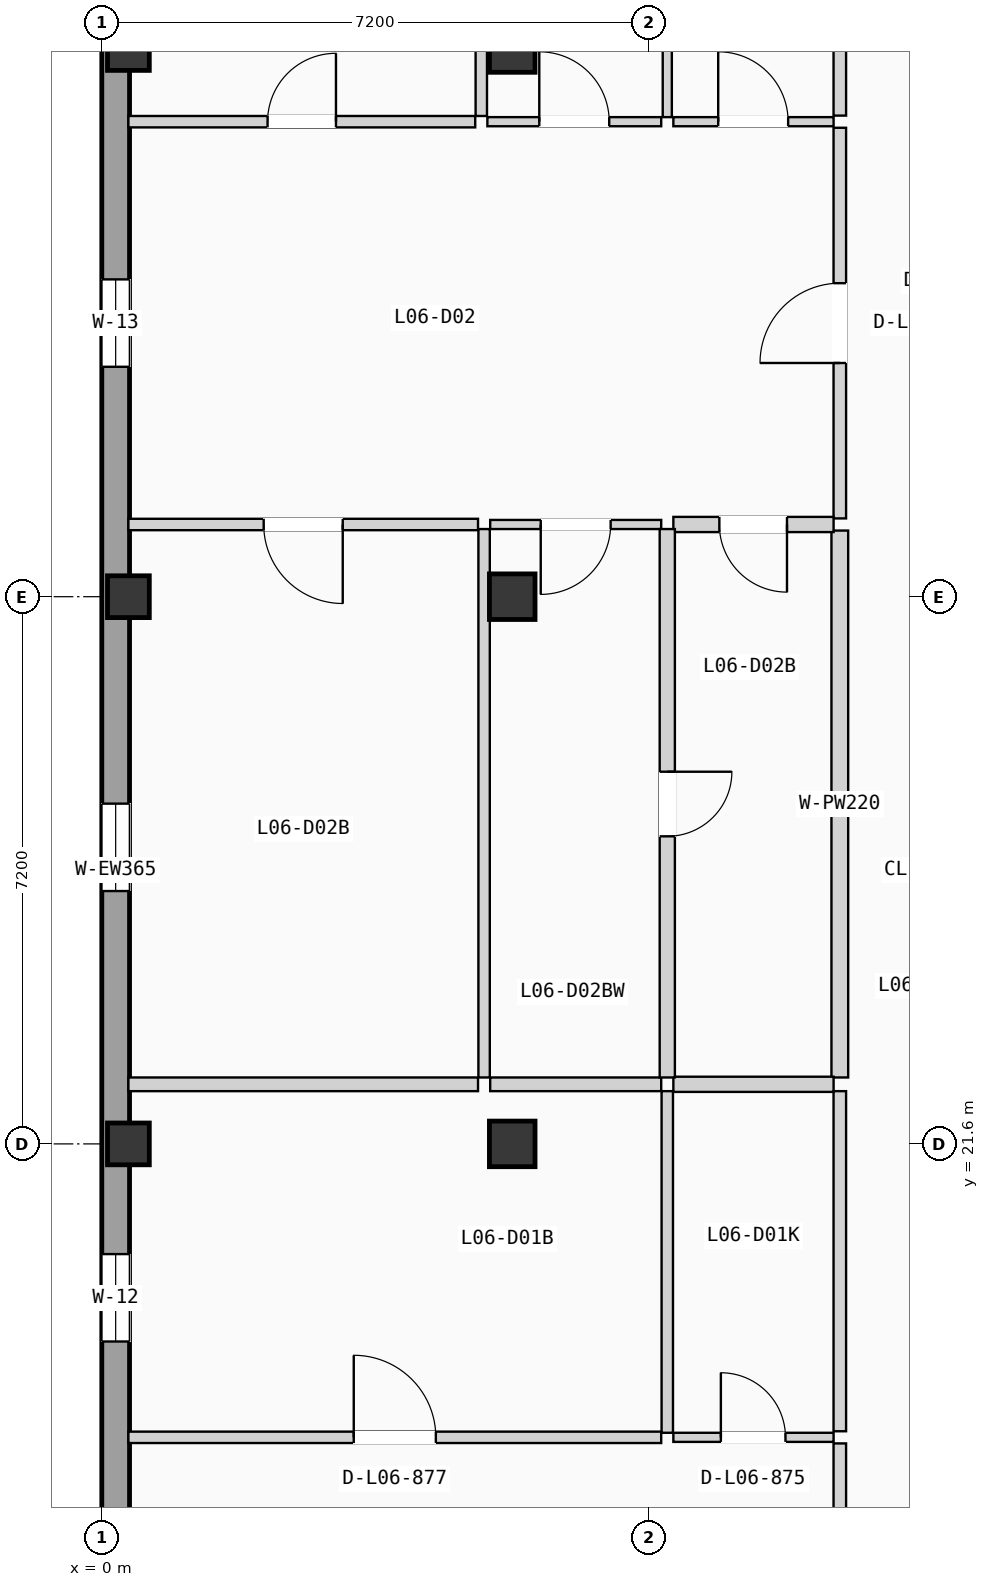
"""IFC4 building model, lengths in metres.
Left out: names, types, materials, properties, quantities, classifications, styles, units other than length and angle.
Written with IfcOpenShell. Run it as: python <this file> out.ifc"""

import sys

from ifc_helpers import new_model, si_unit, direction, frame, frame_2d, origin, origin_2d, place, context, subcontext, project, spatial, rectangle, extrude, element, fill, save


model = new_model("IFC4")
c1 = context("Model", 3, precision=1e-05, world=origin(), true_north=direction((0.0, 1.0)))
c2 = subcontext(c1, "Body", "Model", "MODEL_VIEW")
j1 = project(units=[si_unit("LENGTHUNIT", "METRE"), si_unit("PLANEANGLEUNIT", "RADIAN")], contexts=[c1])
p1 = place(None, origin())
s1 = spatial("IfcSite", under=j1, at=p1, CompositionType="ELEMENT")
p2 = place(p1, origin())
s2 = spatial("IfcBuilding", under=s1, at=p2, CompositionType="ELEMENT")
p3 = place(p2, frame((0.0, 0.0, 21.525)))
s3 = spatial("IfcBuildingStorey", under=s2, at=p3, CompositionType="ELEMENT", Elevation=21.525)
for number, where, z_axis, x_axis in (
    (1, (0.35, 21.6, 0.0), (0.0, 0.0, 1.0), (1.0, 0.0, 0.0)),
    (2, (0.35, 28.8, 0.0), (0.0, 0.0, 1.0), (1.0, 0.0, 0.0)),
    (3, (0.35, 36.0, 0.0), (0.0, 0.0, 1.0), (1.0, 0.0, 0.0)),
):
    element("IfcColumn", number, at=place(p3, frame(where, z_axis=z_axis, x_axis=x_axis)), inside=s3, PredefinedType="COLUMN", context=c2, shape_type="SweptSolid", body=[
        extrude(rectangle(XDim=0.55, YDim=0.55, at=origin_2d()), origin(), (0.0, 0.0, 1.0), 3.15),
    ])
for number, where, z_axis, x_axis in (
    (4, (5.4, 21.6, 0.0), (0.0, 0.0, 1.0), (1.0, 0.0, 0.0)),
    (5, (5.4, 28.8, 0.0), (0.0, 0.0, 1.0), (1.0, 0.0, 0.0)),
    (6, (5.4, 36.0, 0.0), (0.0, 0.0, 1.0), (1.0, 0.0, 0.0)),
):
    element("IfcColumn", number, at=place(p3, frame(where, z_axis=z_axis, x_axis=x_axis)), inside=s3, PredefinedType="COLUMN", context=c2, shape_type="SweptSolid", body=[
        extrude(rectangle(XDim=0.6, YDim=0.6, at=origin_2d()), origin(), (0.0, 0.0, 1.0), 3.15),
    ])
p4 = place(p3, frame((0.183, 0.365, 0.0), z_axis=(0.0, 0.0, 1.0), x_axis=(0.0, 1.0, 0.0)))
e7 = element("IfcWall", 7, at=p4, inside=s3, PredefinedType="SOLIDWALL", context=c2, shape_type="SweptSolid", body=[
    extrude(rectangle(XDim=49.67, YDim=0.365, at=frame_2d((24.835, 0.0))), origin(), (0.0, 0.0, 1.0), 2.89),
])
p5 = place(p4, frame((15.325, 0.0, 0.85)))
e8 = element("IfcOpeningElement", 8, at=p5, cuts=e7, PredefinedType="OPENING", context=c2, shape_type="SweptSolid", body=[
    extrude(rectangle(XDim=0.95, YDim=1.2, at=frame_2d((0.475, 0.6))), frame((0.0, 0.192, 0.0), z_axis=(0.0, -1.0, 0.0), x_axis=(1.0, 0.0, 0.0)), (0.0, 0.0, 1.0), 0.385),
])
p6 = place(p4, frame((8.897, 0.0, 0.9)))
e9 = element("IfcOpeningElement", 9, at=p6, cuts=e7, PredefinedType="OPENING", context=c2, shape_type="SweptSolid", body=[
    extrude(rectangle(XDim=1.15, YDim=1.2, at=frame_2d((0.575, 0.6))), frame((0.0, 0.192, 0.0), z_axis=(0.0, -1.0, 0.0), x_axis=(1.0, 0.0, 0.0)), (0.0, 0.0, 1.0), 0.385),
])
p7 = place(p4, frame((18.635, 0.0, 0.855)))
e10 = element("IfcOpeningElement", 10, at=p7, cuts=e7, PredefinedType="OPENING", context=c2, shape_type="SweptSolid", body=[
    extrude(rectangle(XDim=1.15, YDim=1.35, at=frame_2d((0.575, 0.675))), frame((0.0, 0.192, 0.0), z_axis=(0.0, -1.0, 0.0), x_axis=(1.0, 0.0, 0.0)), (0.0, 0.0, 1.0), 0.385),
])
p8 = place(p4, frame((31.46, 0.0, 0.705)))
e11 = element("IfcOpeningElement", 11, at=p8, cuts=e7, PredefinedType="OPENING", context=c2, shape_type="SweptSolid", body=[
    extrude(rectangle(XDim=1.15, YDim=1.5, at=frame_2d((0.575, 0.75))), frame((0.0, 0.192, 0.0), z_axis=(0.0, -1.0, 0.0), x_axis=(1.0, 0.0, 0.0)), (0.0, 0.0, 1.0), 0.385),
])
p9 = place(p4, frame((24.562, 0.0, 0.555)))
e12 = element("IfcOpeningElement", 12, at=p9, cuts=e7, PredefinedType="OPENING", context=c2, shape_type="SweptSolid", body=[
    extrude(rectangle(XDim=1.15, YDim=1.65, at=frame_2d((0.575, 0.825))), frame((0.0, 0.192, 0.0), z_axis=(0.0, -1.0, 0.0), x_axis=(1.0, 0.0, 0.0)), (0.0, 0.0, 1.0), 0.385),
])
p10 = place(p4, frame((38.695, 0.0, 0.85)))
e13 = element("IfcOpeningElement", 13, at=p10, cuts=e7, PredefinedType="OPENING", context=c2, shape_type="SweptSolid", body=[
    extrude(rectangle(XDim=0.95, YDim=1.2, at=frame_2d((0.475, 0.6))), frame((0.0, 0.192, 0.0), z_axis=(0.0, -1.0, 0.0), x_axis=(1.0, 0.0, 0.0)), (0.0, 0.0, 1.0), 0.385),
])
p11 = place(p3, frame((9.71, 12.235, 0.0), z_axis=(0.0, 0.0, 1.0), x_axis=(0.0, 1.0, 0.0)))
e14 = element("IfcWall", 14, at=p11, inside=s3, PredefinedType="PARTITIONING", context=c2, shape_type="SweptSolid", body=[
    extrude(rectangle(XDim=5.424, YDim=0.165, at=frame_2d((2.712, 0.0))), origin(), (0.0, 0.0, 1.0), 2.87),
])
p12 = place(p11, frame((2.187, 0.0, 0.0)))
e15 = element("IfcOpeningElement", 15, at=p12, cuts=e14, PredefinedType="OPENING", context=c2, shape_type="SweptSolid", body=[
    extrude(rectangle(XDim=1.05, YDim=2.13, at=frame_2d((0.525, 1.065))), frame((0.0, 0.093, 0.0), z_axis=(0.0, -1.0, 0.0), x_axis=(1.0, 0.0, 0.0)), (0.0, 0.0, 1.0), 0.185),
])
p13 = place(p3, frame((9.71, 17.819, 0.0), z_axis=(0.0, 0.0, 1.0), x_axis=(0.0, 1.0, 0.0)))
e16 = element("IfcWall", 16, at=p13, inside=s3, PredefinedType="PARTITIONING", context=c2, shape_type="SweptSolid", body=[
    extrude(rectangle(XDim=4.475, YDim=0.165, at=frame_2d((2.237, 0.0))), origin(), (0.0, 0.0, 1.0), 2.87),
])
p14 = place(p3, frame((9.71, 29.83, 0.0), z_axis=(0.0, 0.0, 1.0), x_axis=(0.0, 1.0, 0.0)))
e17 = element("IfcWall", 17, at=p14, inside=s3, PredefinedType="PARTITIONING", context=c2, shape_type="SweptSolid", body=[
    extrude(rectangle(XDim=5.14, YDim=0.165, at=frame_2d((2.57, 0.0))), origin(), (0.0, 0.0, 1.0), 2.87),
])
p15 = place(p14, frame((2.045, 0.0, 0.0)))
e18 = element("IfcOpeningElement", 18, at=p15, cuts=e17, PredefinedType="OPENING", context=c2, shape_type="SweptSolid", body=[
    extrude(rectangle(XDim=1.05, YDim=2.13, at=frame_2d((0.525, 1.065))), frame((0.0, 0.093, 0.0), z_axis=(0.0, -1.0, 0.0), x_axis=(1.0, 0.0, 0.0)), (0.0, 0.0, 1.0), 0.185),
])
p16 = place(p3, frame((9.71, 22.474, 0.0), z_axis=(0.0, 0.0, 1.0), x_axis=(0.0, 1.0, 0.0)))
e19 = element("IfcWall", 19, at=p16, inside=s3, PredefinedType="PLUMBINGWALL", context=c2, shape_type="SweptSolid", body=[
    extrude(rectangle(XDim=7.196, YDim=0.22, at=frame_2d((3.598, 0.0))), origin(), (0.0, 0.0, 1.0), 2.87),
])
p17 = place(p3, frame((9.71, 35.13, 0.0), z_axis=(0.0, 0.0, 1.0), x_axis=(0.0, 1.0, 0.0)))
e20 = element("IfcWall", 20, at=p17, inside=s3, PredefinedType="PARTITIONING", context=c2, shape_type="SweptSolid", body=[
    extrude(rectangle(XDim=7.67, YDim=0.165, at=frame_2d((3.835, 0.0))), origin(), (0.0, 0.0, 1.0), 2.87),
])
p18 = place(p3, frame((7.52, 17.739, 0.0), z_axis=(0.0, 0.0, 1.0), x_axis=(1.0, 0.0, 0.0)))
e21 = element("IfcWall", 21, at=p18, inside=s3, PredefinedType="PARTITIONING", context=c2, shape_type="SweptSolid", body=[
    extrude(rectangle(XDim=2.108, YDim=0.12, at=frame_2d((1.054, 0.0))), origin(), (0.0, 0.0, 1.0), 2.87),
])
p19 = place(p18, frame((0.625, 0.0, 0.0)))
e22 = element("IfcOpeningElement", 22, at=p19, cuts=e21, PredefinedType="OPENING", context=c2, shape_type="SweptSolid", body=[
    extrude(rectangle(XDim=0.85, YDim=2.01, at=frame_2d((0.425, 1.005))), frame((0.0, 0.07, 0.0), z_axis=(0.0, -1.0, 0.0), x_axis=(1.0, 0.0, 0.0)), (0.0, 0.0, 1.0), 0.14),
])
p20 = place(p3, frame((0.35, 17.739, 0.0), z_axis=(0.0, 0.0, 1.0), x_axis=(1.0, 0.0, 0.0)))
e23 = element("IfcWall", 23, at=p20, inside=s3, PredefinedType="PARTITIONING", context=c2, shape_type="SweptSolid", body=[
    extrude(rectangle(XDim=7.01, YDim=0.15, at=frame_2d((3.505, 0.0))), origin(), (0.0, 0.0, 1.0), 2.87),
])
p21 = place(p20, frame((2.965, 0.0, 0.0)))
e24 = element("IfcOpeningElement", 24, at=p21, cuts=e23, PredefinedType="OPENING", context=c2, shape_type="SweptSolid", body=[
    extrude(rectangle(XDim=1.08, YDim=2.1, at=frame_2d((0.54, 1.05))), frame((0.0, 0.085, 0.0), z_axis=(0.0, -1.0, 0.0), x_axis=(1.0, 0.0, 0.0)), (0.0, 0.0, 1.0), 0.17),
])
p22 = place(p3, frame((7.44, 17.799, 0.0), z_axis=(0.0, 0.0, 1.0), x_axis=(0.0, 1.0, 0.0)))
e25 = element("IfcWall", 25, at=p22, inside=s3, PredefinedType="PARTITIONING", context=c2, shape_type="SweptSolid", body=[
    extrude(rectangle(XDim=4.495, YDim=0.15, at=frame_2d((2.248, 0.0))), origin(), (0.0, 0.0, 1.0), 2.87),
])
p23 = place(p3, frame((7.52, 22.384, 0.0), z_axis=(0.0, 0.0, 1.0), x_axis=(1.0, 0.0, 0.0)))
e26 = element("IfcWall", 26, at=p23, inside=s3, PredefinedType="PLUMBINGWALL", context=c2, shape_type="SweptSolid", body=[
    extrude(rectangle(XDim=2.108, YDim=0.2, at=frame_2d((1.054, 0.0))), origin(), (0.0, 0.0, 1.0), 2.87),
])
p24 = place(p3, frame((0.35, 22.384, 0.0), z_axis=(0.0, 0.0, 1.0), x_axis=(1.0, 0.0, 0.0)))
e27 = element("IfcWall", 27, at=p24, inside=s3, PredefinedType="PARTITIONING", context=c2, shape_type="SweptSolid", body=[
    extrude(rectangle(XDim=4.6, YDim=0.18, at=frame_2d((2.3, 0.0))), origin(), (0.0, 0.0, 1.0), 2.87),
])
p25 = place(p3, frame((5.11, 22.384, 0.0), z_axis=(0.0, 0.0, 1.0), x_axis=(1.0, 0.0, 0.0)))
e28 = element("IfcWall", 28, at=p25, inside=s3, PredefinedType="PARTITIONING", context=c2, shape_type="SweptSolid", body=[
    extrude(rectangle(XDim=2.25, YDim=0.18, at=frame_2d((1.125, 0.0))), origin(), (0.0, 0.0, 1.0), 2.87),
])
p26 = place(p3, frame((7.52, 29.75, 0.0), z_axis=(0.0, 0.0, 1.0), x_axis=(1.0, 0.0, 0.0)))
e29 = element("IfcWall", 29, at=p26, inside=s3, PredefinedType="PLUMBINGWALL", context=c2, shape_type="SweptSolid", body=[
    extrude(rectangle(XDim=2.108, YDim=0.2, at=frame_2d((1.054, 0.0))), origin(), (0.0, 0.0, 1.0), 2.87),
])
p27 = place(p26, frame((0.605, 0.0, 0.0)))
e30 = element("IfcOpeningElement", 30, at=p27, cuts=e29, PredefinedType="OPENING", context=c2, shape_type="SweptSolid", body=[
    extrude(rectangle(XDim=0.89, YDim=2.03, at=frame_2d((0.445, 1.015))), frame((0.0, 0.11, 0.0), z_axis=(0.0, -1.0, 0.0), x_axis=(1.0, 0.0, 0.0)), (0.0, 0.0, 1.0), 0.22),
])
p28 = place(p3, frame((7.52, 35.05, 0.0), z_axis=(0.0, 0.0, 1.0), x_axis=(1.0, 0.0, 0.0)))
e31 = element("IfcWall", 31, at=p28, inside=s3, PredefinedType="PARTITIONING", context=c2, shape_type="SweptSolid", body=[
    extrude(rectangle(XDim=2.108, YDim=0.12, at=frame_2d((1.054, 0.0))), origin(), (0.0, 0.0, 1.0), 2.87),
])
p29 = place(p28, frame((0.59, 0.0, 0.0)))
e32 = element("IfcOpeningElement", 32, at=p29, cuts=e31, PredefinedType="OPENING", context=c2, shape_type="SweptSolid", body=[
    extrude(rectangle(XDim=0.92, YDim=2.02, at=frame_2d((0.46, 1.01))), frame((0.0, 0.07, 0.0), z_axis=(0.0, -1.0, 0.0), x_axis=(1.0, 0.0, 0.0)), (0.0, 0.0, 1.0), 0.14),
])
p30 = place(p3, frame((0.35, 29.75, 0.0), z_axis=(0.0, 0.0, 1.0), x_axis=(1.0, 0.0, 0.0)))
e33 = element("IfcWall", 33, at=p30, inside=s3, PredefinedType="PARTITIONING", context=c2, shape_type="SweptSolid", body=[
    extrude(rectangle(XDim=4.6, YDim=0.15, at=frame_2d((2.3, 0.0))), origin(), (0.0, 0.0, 1.0), 2.87),
])
p31 = place(p30, frame((1.78, 0.0, 0.0)))
e34 = element("IfcOpeningElement", 34, at=p31, cuts=e33, PredefinedType="OPENING", context=c2, shape_type="SweptSolid", body=[
    extrude(rectangle(XDim=1.04, YDim=2.08, at=frame_2d((0.52, 1.04))), frame((0.0, 0.085, 0.0), z_axis=(0.0, -1.0, 0.0), x_axis=(1.0, 0.0, 0.0)), (0.0, 0.0, 1.0), 0.17),
])
p32 = place(p3, frame((5.11, 29.75, 0.0), z_axis=(0.0, 0.0, 1.0), x_axis=(1.0, 0.0, 0.0)))
e35 = element("IfcWall", 35, at=p32, inside=s3, PredefinedType="PARTITIONING", context=c2, shape_type="SweptSolid", body=[
    extrude(rectangle(XDim=2.25, YDim=0.12, at=frame_2d((1.125, 0.0))), origin(), (0.0, 0.0, 1.0), 2.87),
])
p33 = place(p32, frame((0.665, 0.0, 0.0)))
e36 = element("IfcOpeningElement", 36, at=p33, cuts=e35, PredefinedType="OPENING", context=c2, shape_type="SweptSolid", body=[
    extrude(rectangle(XDim=0.92, YDim=2.02, at=frame_2d((0.46, 1.01))), frame((0.0, 0.07, 0.0), z_axis=(0.0, -1.0, 0.0), x_axis=(1.0, 0.0, 0.0)), (0.0, 0.0, 1.0), 0.14),
])
p34 = place(p3, frame((0.35, 35.05, 0.0), z_axis=(0.0, 0.0, 1.0), x_axis=(1.0, 0.0, 0.0)))
e37 = element("IfcWall", 37, at=p34, inside=s3, PredefinedType="PARTITIONING", context=c2, shape_type="SweptSolid", body=[
    extrude(rectangle(XDim=4.563, YDim=0.15, at=frame_2d((2.281, 0.0))), origin(), (0.0, 0.0, 1.0), 2.87),
])
p35 = place(p34, frame((1.831, 0.0, 0.0)))
e38 = element("IfcOpeningElement", 38, at=p35, cuts=e37, PredefinedType="OPENING", context=c2, shape_type="SweptSolid", body=[
    extrude(rectangle(XDim=0.9, YDim=2.04, at=frame_2d((0.45, 1.02))), frame((0.0, 0.085, 0.0), z_axis=(0.0, -1.0, 0.0), x_axis=(1.0, 0.0, 0.0)), (0.0, 0.0, 1.0), 0.17),
])
p36 = place(p3, frame((5.073, 35.05, 0.0), z_axis=(0.0, 0.0, 1.0), x_axis=(1.0, 0.0, 0.0)))
e39 = element("IfcWall", 39, at=p36, inside=s3, PredefinedType="PARTITIONING", context=c2, shape_type="SweptSolid", body=[
    extrude(rectangle(XDim=2.287, YDim=0.12, at=frame_2d((1.144, 0.0))), origin(), (0.0, 0.0, 1.0), 2.87),
])
p37 = place(p36, frame((0.683, 0.0, 0.0)))
e40 = element("IfcOpeningElement", 40, at=p37, cuts=e39, PredefinedType="OPENING", context=c2, shape_type="SweptSolid", body=[
    extrude(rectangle(XDim=0.92, YDim=2.02, at=frame_2d((0.46, 1.01))), frame((0.0, 0.07, 0.0), z_axis=(0.0, -1.0, 0.0), x_axis=(1.0, 0.0, 0.0)), (0.0, 0.0, 1.0), 0.14),
])
p38 = place(p3, frame((7.44, 22.474, 0.0), z_axis=(0.0, 0.0, 1.0), x_axis=(0.0, 1.0, 0.0)))
e41 = element("IfcWall", 41, at=p38, inside=s3, PredefinedType="PLUMBINGWALL", context=c2, shape_type="SweptSolid", body=[
    extrude(rectangle(XDim=7.216, YDim=0.2, at=frame_2d((3.608, 0.0))), origin(), (0.0, 0.0, 1.0), 2.87),
])
p39 = place(p38, frame((3.173, 0.0, 0.0)))
e42 = element("IfcOpeningElement", 42, at=p39, cuts=e41, PredefinedType="OPENING", context=c2, shape_type="SweptSolid", body=[
    extrude(rectangle(XDim=0.85, YDim=2.01, at=frame_2d((0.425, 1.005))), frame((0.0, 0.11, 0.0), z_axis=(0.0, -1.0, 0.0), x_axis=(1.0, 0.0, 0.0)), (0.0, 0.0, 1.0), 0.22),
])
p40 = place(p3, frame((7.44, 35.11, 0.0), z_axis=(0.0, 0.0, 1.0), x_axis=(0.0, 1.0, 0.0)))
e43 = element("IfcWall", 43, at=p40, inside=s3, PredefinedType="PARTITIONING", context=c2, shape_type="SweptSolid", body=[
    extrude(rectangle(XDim=7.69, YDim=0.12, at=frame_2d((3.845, 0.0))), origin(), (0.0, 0.0, 1.0), 2.87),
])
p41 = place(p3, frame((5.03, 22.474, 0.0), z_axis=(0.0, 0.0, 1.0), x_axis=(0.0, 1.0, 0.0)))
e44 = element("IfcWall", 44, at=p41, inside=s3, PredefinedType="PARTITIONING", context=c2, shape_type="SweptSolid", body=[
    extrude(rectangle(XDim=7.216, YDim=0.15, at=frame_2d((3.608, 0.0))), origin(), (0.0, 0.0, 1.0), 2.87),
])
p42 = place(p3, frame((4.993, 35.125, 0.0), z_axis=(0.0, 0.0, 1.0), x_axis=(0.0, 1.0, 0.0)))
e45 = element("IfcWall", 45, at=p42, inside=s3, PredefinedType="PARTITIONING", context=c2, shape_type="SweptSolid", body=[
    extrude(rectangle(XDim=7.675, YDim=0.15, at=frame_2d((3.837, 0.0))), origin(), (0.0, 0.0, 1.0), 2.87),
])
p43 = place(p7, origin())
e46 = element("IfcWindow", 46, at=p43, inside=s3, PartitioningType="SINGLE_PANEL", PredefinedType="WINDOW", context=c2, shape_type="SweptSolid", body=[
    extrude(rectangle(XDim=1.15, YDim=1.35, at=frame_2d((0.575, 0.675))), frame((0.0, 0.03, 0.0), z_axis=(0.0, -1.0, 0.0), x_axis=(1.0, 0.0, 0.0)), (0.0, 0.0, 1.0), 0.06),
])
fill(e10, e46)
p44 = place(p8, origin())
e47 = element("IfcWindow", 47, at=p44, inside=s3, PartitioningType="SINGLE_PANEL", PredefinedType="WINDOW", context=c2, shape_type="SweptSolid", body=[
    extrude(rectangle(XDim=1.15, YDim=1.5, at=frame_2d((0.575, 0.75))), frame((0.0, 0.03, 0.0), z_axis=(0.0, -1.0, 0.0), x_axis=(1.0, 0.0, 0.0)), (0.0, 0.0, 1.0), 0.06),
])
fill(e11, e47)
p45 = place(p9, origin())
e48 = element("IfcWindow", 48, at=p45, inside=s3, PartitioningType="SINGLE_PANEL", PredefinedType="WINDOW", context=c2, shape_type="SweptSolid", body=[
    extrude(rectangle(XDim=1.15, YDim=1.65, at=frame_2d((0.575, 0.825))), frame((0.0, 0.03, 0.0), z_axis=(0.0, -1.0, 0.0), x_axis=(1.0, 0.0, 0.0)), (0.0, 0.0, 1.0), 0.06),
])
fill(e12, e48)
p46 = place(p15, origin())
e49 = element("IfcDoor", 49, at=p46, inside=s3, OperationType="SINGLE_SWING_LEFT", PredefinedType="DOOR", context=c2, shape_type="SweptSolid", body=[
    extrude(rectangle(XDim=1.05, YDim=2.13, at=frame_2d((0.525, 1.065))), frame((0.0, 0.025, 0.0), z_axis=(0.0, -1.0, 0.0), x_axis=(1.0, 0.0, 0.0)), (0.0, 0.0, 1.0), 0.05),
])
fill(e18, e49)
p47 = place(p19, origin())
e50 = element("IfcDoor", 50, at=p47, inside=s3, OperationType="SINGLE_SWING_LEFT", PredefinedType="DOOR", context=c2, shape_type="SweptSolid", body=[
    extrude(rectangle(XDim=0.85, YDim=2.01, at=frame_2d((0.425, 1.005))), frame((0.0, 0.025, 0.0), z_axis=(0.0, -1.0, 0.0), x_axis=(1.0, 0.0, 0.0)), (0.0, 0.0, 1.0), 0.05),
])
fill(e22, e50)
p48 = place(p21, origin())
e51 = element("IfcDoor", 51, at=p48, inside=s3, OperationType="SINGLE_SWING_LEFT", PredefinedType="DOOR", context=c2, shape_type="SweptSolid", body=[
    extrude(rectangle(XDim=1.08, YDim=2.1, at=frame_2d((0.54, 1.05))), frame((0.0, 0.025, 0.0), z_axis=(0.0, -1.0, 0.0), x_axis=(1.0, 0.0, 0.0)), (0.0, 0.0, 1.0), 0.05),
])
fill(e24, e51)
p49 = place(p27, frame((0.89, 0.0, 0.0), z_axis=(0.0, 0.0, 1.0), x_axis=(-1.0, 0.0, 0.0)))
e52 = element("IfcDoor", 52, at=p49, inside=s3, OperationType="SINGLE_SWING_RIGHT", PredefinedType="DOOR", context=c2, shape_type="SweptSolid", body=[
    extrude(rectangle(XDim=0.89, YDim=2.03, at=frame_2d((0.445, 1.015))), frame((0.0, 0.025, 0.0), z_axis=(0.0, -1.0, 0.0), x_axis=(1.0, 0.0, 0.0)), (0.0, 0.0, 1.0), 0.05),
])
fill(e30, e52)
p50 = place(p29, origin())
e53 = element("IfcDoor", 53, at=p50, inside=s3, OperationType="SINGLE_SWING_LEFT", PredefinedType="DOOR", context=c2, shape_type="SweptSolid", body=[
    extrude(rectangle(XDim=0.92, YDim=2.02, at=frame_2d((0.46, 1.01))), frame((0.0, 0.025, 0.0), z_axis=(0.0, -1.0, 0.0), x_axis=(1.0, 0.0, 0.0)), (0.0, 0.0, 1.0), 0.05),
])
fill(e32, e53)
p51 = place(p31, frame((1.04, 0.0, 0.0), z_axis=(0.0, 0.0, 1.0), x_axis=(-1.0, 0.0, 0.0)))
e54 = element("IfcDoor", 54, at=p51, inside=s3, OperationType="SINGLE_SWING_RIGHT", PredefinedType="DOOR", context=c2, shape_type="SweptSolid", body=[
    extrude(rectangle(XDim=1.04, YDim=2.08, at=frame_2d((0.52, 1.04))), frame((0.0, 0.025, 0.0), z_axis=(0.0, -1.0, 0.0), x_axis=(1.0, 0.0, 0.0)), (0.0, 0.0, 1.0), 0.05),
])
fill(e34, e54)
p52 = place(p33, frame((0.92, 0.0, 0.0), z_axis=(0.0, 0.0, 1.0), x_axis=(-1.0, 0.0, 0.0)))
e55 = element("IfcDoor", 55, at=p52, inside=s3, OperationType="SINGLE_SWING_LEFT", PredefinedType="DOOR", context=c2, shape_type="SweptSolid", body=[
    extrude(rectangle(XDim=0.92, YDim=2.02, at=frame_2d((0.46, 1.01))), frame((0.0, 0.025, 0.0), z_axis=(0.0, -1.0, 0.0), x_axis=(1.0, 0.0, 0.0)), (0.0, 0.0, 1.0), 0.05),
])
fill(e36, e55)
p53 = place(p35, origin())
e56 = element("IfcDoor", 56, at=p53, inside=s3, OperationType="SINGLE_SWING_RIGHT", PredefinedType="DOOR", context=c2, shape_type="SweptSolid", body=[
    extrude(rectangle(XDim=0.9, YDim=2.04, at=frame_2d((0.45, 1.02))), frame((0.0, 0.025, 0.0), z_axis=(0.0, -1.0, 0.0), x_axis=(1.0, 0.0, 0.0)), (0.0, 0.0, 1.0), 0.05),
])
fill(e38, e56)
p54 = place(p37, origin())
e57 = element("IfcDoor", 57, at=p54, inside=s3, OperationType="SINGLE_SWING_LEFT", PredefinedType="DOOR", context=c2, shape_type="SweptSolid", body=[
    extrude(rectangle(XDim=0.92, YDim=2.02, at=frame_2d((0.46, 1.01))), frame((0.0, 0.025, 0.0), z_axis=(0.0, -1.0, 0.0), x_axis=(1.0, 0.0, 0.0)), (0.0, 0.0, 1.0), 0.05),
])
fill(e40, e57)
p55 = place(p39, frame((0.85, 0.0, 0.0), z_axis=(0.0, 0.0, 1.0), x_axis=(-1.0, 0.0, 0.0)))
e58 = element("IfcDoor", 58, at=p55, inside=s3, OperationType="SINGLE_SWING_RIGHT", PredefinedType="DOOR", context=c2, shape_type="SweptSolid", body=[
    extrude(rectangle(XDim=0.85, YDim=2.01, at=frame_2d((0.425, 1.005))), frame((0.0, 0.025, 0.0), z_axis=(0.0, -1.0, 0.0), x_axis=(1.0, 0.0, 0.0)), (0.0, 0.0, 1.0), 0.05),
])
fill(e42, e58)
save(model, sys.argv[1])
